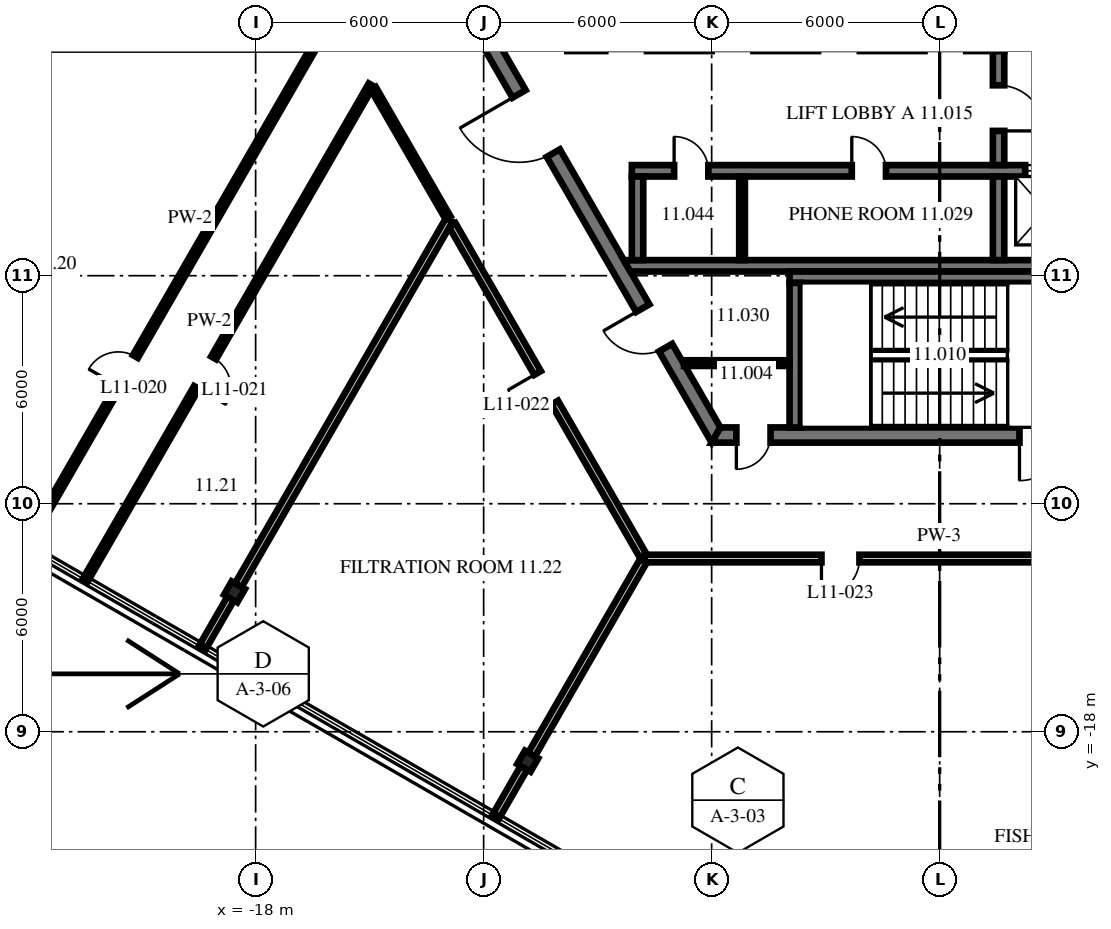
"""IFC4 building model, lengths in metres.
Left out: names, types, materials, properties, quantities, classifications, styles, units other than length and angle.
Written with IfcOpenShell. Run it as: python <this file> out.ifc"""

import sys

from ifc_helpers import new_model, si_unit, direction, frame, frame_2d, origin, origin_2d, place, context, subcontext, project, spatial, polyline, rectangle, i_section, outline, extrude, source, transform, mapped, element, fill, save


model = new_model("IFC4")
c1 = context("Model", 3, precision=1e-05, world=origin(), true_north=direction((0.0, 1.0)))
c2 = subcontext(c1, "Body", "Model", "MODEL_VIEW")
j1 = project(units=[si_unit("LENGTHUNIT", "METRE"), si_unit("PLANEANGLEUNIT", "RADIAN")], contexts=[c1])
p1 = place(None, origin())
s1 = spatial("IfcSite", under=j1, at=p1, CompositionType="ELEMENT")
p2 = place(p1, origin())
s2 = spatial("IfcBuilding", under=s1, at=p2, CompositionType="ELEMENT")
p3 = place(p2, frame((0.0, 0.0, 50.4)))
s3 = spatial("IfcBuildingStorey", under=s2, at=p3, CompositionType="ELEMENT", Elevation=50.4)
m1 = source(origin(), c2, "Body", "SweptSolid", [
    extrude(i_section(OverallWidth=0.404, OverallDepth=0.406, WebThickness=0.027, FlangeThickness=0.044, at=origin_2d()), origin(), (0.0, 0.0, 1.0), 3.15),
])
for number, where, z_axis, x_axis in (
    (1, (-18.556, -14.32, 0.0), (0.0, 0.0, 1.0), (0.866, -0.5, 0.0)),
    (2, (-10.84, -18.775, 0.0), (0.0, 0.0, 1.0), (0.866, -0.5, 0.0)),
):
    element("IfcColumn", number, at=place(p3, frame(where, z_axis=z_axis, x_axis=x_axis)), inside=s3, PredefinedType="COLUMN", context=c2, shape_type="MappedRepresentation", body=[
        mapped(m1, transform((0.0, 0.0, 0.0), scale=1.0)),
    ])
m2 = source(origin(), c2, "Body", "SweptSolid", [
    extrude(outline(polyline([(-0.115, -0.2), (11.885, -0.2), (11.654, 0.2), (0.115, 0.2), (-0.115, -0.2)])), origin(), (0.0, 0.0, 1.0), 4.05),
])
p4 = place(p3, frame((-11.769, 0.0, 0.0), z_axis=(0.0, 0.0, 1.0), x_axis=(0.499996592174, -0.866027371285, 0.0)))
e3 = element("IfcWall", 3, at=p4, inside=s3, PredefinedType="SHEAR", context=c2, shape_type="MappedRepresentation", body=[
    mapped(m2, transform((0.0, 0.0, 0.0), scale=1.0)),
])
p5 = place(p4, frame((1.405, 0.0, 0.0)))
e4 = element("IfcOpeningElement", 4, at=p5, cuts=e3, PredefinedType="OPENING", context=c2, shape_type="SweptSolid", body=[
    extrude(rectangle(XDim=1.8, YDim=2.1, at=frame_2d((0.9, 1.05))), frame((0.0, 0.21, 0.0), z_axis=(0.0, -1.0, 0.0), x_axis=(1.0, 0.0, 0.0)), (0.0, 0.0, 1.0), 0.42),
])
p6 = place(p4, frame((7.915, 0.0, 0.0)))
e5 = element("IfcOpeningElement", 5, at=p6, cuts=e3, PredefinedType="OPENING", context=c2, shape_type="SweptSolid", body=[
    extrude(rectangle(XDim=1.2, YDim=2.1, at=frame_2d((0.6, 1.05))), frame((0.0, 0.21, 0.0), z_axis=(0.0, -1.0, 0.0), x_axis=(1.0, 0.0, 0.0)), (0.0, 0.0, 1.0), 0.42),
])
p7 = place(p3, frame((-5.885, -10.192, 0.0), z_axis=(0.0, 0.0, 1.0), x_axis=(1.0, 0.0, 0.0)))
e6 = element("IfcWall", 6, at=p7, inside=s3, PredefinedType="SHEAR", context=c2, shape_type="MappedRepresentation", body=[
    mapped(m2, transform((0.0, 0.0, 0.0), scale=1.0)),
])
p8 = place(p7, frame((7.985, 0.0, 0.0)))
e7 = element("IfcOpeningElement", 7, at=p8, cuts=e6, PredefinedType="OPENING", context=c2, shape_type="SweptSolid", body=[
    extrude(rectangle(XDim=1.2, YDim=2.1, at=frame_2d((0.6, 1.05))), frame((0.0, 0.21, 0.0), z_axis=(0.0, -1.0, 0.0), x_axis=(1.0, 0.0, 0.0)), (0.0, 0.0, 1.0), 0.42),
])
p9 = place(p7, frame((0.534, 0.0, 0.0)))
e8 = element("IfcOpeningElement", 8, at=p9, cuts=e6, PredefinedType="OPENING", context=c2, shape_type="SweptSolid", body=[
    extrude(rectangle(XDim=0.9, YDim=2.1, at=frame_2d((0.45, 1.05))), frame((0.0, 0.21, 0.0), z_axis=(0.0, -1.0, 0.0), x_axis=(1.0, 0.0, 0.0)), (0.0, 0.0, 1.0), 0.42),
])
p10 = place(p3, frame((-8.1, -3.24, 0.0), z_axis=(0.0, 0.0, 1.0), x_axis=(1.0, 0.0, 0.0)))
e9 = element("IfcWall", 9, at=p10, inside=s3, PredefinedType="SHEAR", context=c2, shape_type="SweptSolid", body=[
    extrude(rectangle(XDim=12.8, YDim=0.3, at=frame_2d((6.4, 0.0))), origin(), (0.0, 0.0, 1.0), 4.05),
])
p11 = place(p10, frame((1.113, 0.0, 0.0)))
e10 = element("IfcOpeningElement", 10, at=p11, cuts=e9, PredefinedType="OPENING", context=c2, shape_type="SweptSolid", body=[
    extrude(rectangle(XDim=0.9, YDim=2.1, at=frame_2d((0.45, 1.05))), frame((0.0, 0.16, 0.0), z_axis=(0.0, -1.0, 0.0), x_axis=(1.0, 0.0, 0.0)), (0.0, 0.0, 1.0), 0.32),
])
p12 = place(p10, frame((5.788, 0.0, 0.0)))
e11 = element("IfcOpeningElement", 11, at=p12, cuts=e9, PredefinedType="OPENING", context=c2, shape_type="SweptSolid", body=[
    extrude(rectangle(XDim=0.9, YDim=2.1, at=frame_2d((0.45, 1.05))), frame((0.0, 0.16, 0.0), z_axis=(0.0, -1.0, 0.0), x_axis=(1.0, 0.0, 0.0)), (0.0, 0.0, 1.0), 0.32),
])
p13 = place(p10, frame((10.35, 0.0, 0.0)))
e12 = element("IfcOpeningElement", 12, at=p13, cuts=e9, PredefinedType="OPENING", context=c2, shape_type="SweptSolid", body=[
    extrude(rectangle(XDim=1.1, YDim=2.1, at=frame_2d((0.55, 1.05))), frame((0.0, 0.16, 0.0), z_axis=(0.0, -1.0, 0.0), x_axis=(1.0, 0.0, 0.0)), (0.0, 0.0, 1.0), 0.32),
])
p14 = place(p3, frame((-8.1, -5.74, 0.0), z_axis=(0.0, 0.0, 1.0), x_axis=(1.0, 0.0, 0.0)))
e13 = element("IfcWall", 13, at=p14, inside=s3, PredefinedType="SHEAR", context=c2, shape_type="SweptSolid", body=[
    extrude(outline(polyline([(12.0, -0.15), (-0.04, -0.15), (-0.213, 0.15), (12.0, 0.15), (12.0, -0.15)])), origin(), (0.0, 0.0, 1.0), 4.05),
])
m3 = source(origin(), c2, "Body", "SweptSolid", [
    extrude(rectangle(XDim=2.2, YDim=0.3, at=frame_2d((1.1, 0.0))), origin(), (0.0, 0.0, 1.0), 4.05),
])
for number, where, z_axis, x_axis in (
    (14, (-7.95, -5.59, 0.0), (0.0, 0.0, 1.0), (0.0, 1.0, 0.0)),
    (15, (1.55, -5.59, 0.0), (0.0, 0.0, 1.0), (0.0, 1.0, 0.0)),
):
    element("IfcWall", number, at=place(p3, frame(where, z_axis=z_axis, x_axis=x_axis)), inside=s3, PredefinedType="SHEAR", context=c2, shape_type="MappedRepresentation", body=[
        mapped(m3, transform((0.0, 0.0, 0.0), scale=1.0)),
    ])
m4 = source(origin(), c2, "Body", "SweptSolid", [
    extrude(rectangle(XDim=3.0, YDim=0.3, at=frame_2d((1.5, 0.0))), origin(), (0.0, 0.0, 1.0), 4.05),
])
p15 = place(p3, frame((1.55, -3.09, 0.0), z_axis=(0.0, 0.0, 1.0), x_axis=(0.0, 1.0, 0.0)))
e16 = element("IfcWall", 16, at=p15, inside=s3, PredefinedType="SHEAR", context=c2, shape_type="MappedRepresentation", body=[
    mapped(m4, transform((0.0, 0.0, 0.0), scale=1.0)),
])
p16 = place(p15, frame((0.9, 0.0, 0.0)))
e17 = element("IfcOpeningElement", 17, at=p16, cuts=e16, PredefinedType="OPENING", context=c2, shape_type="SweptSolid", body=[
    extrude(rectangle(XDim=1.2, YDim=2.1, at=frame_2d((0.6, 1.05))), frame((0.0, 0.16, 0.0), z_axis=(0.0, -1.0, 0.0), x_axis=(1.0, 0.0, 0.0)), (0.0, 0.0, 1.0), 0.32),
])
p17 = place(p3, frame((-3.95, -6.04, 0.0), z_axis=(0.0, 0.0, 1.0), x_axis=(1.0, 0.0, 0.0)))
e18 = element("IfcWall", 18, at=p17, inside=s3, PredefinedType="SHEAR", context=c2, shape_type="SweptSolid", body=[
    extrude(outline(polyline([(0.0, -0.15), (8.95, -0.15), (8.65, 0.15), (0.0, 0.15), (0.0, -0.15)])), origin(), (0.0, 0.0, 1.0), 4.05),
])
m5 = source(origin(), c2, "Body", "SweptSolid", [
    extrude(outline(polyline([(3.8, -0.15), (-0.004, -0.15), (-0.004, 0.15), (3.8, 0.15), (3.8, -0.15)])), origin(), (0.0, 0.0, 1.0), 4.05),
])
p18 = place(p3, frame((-3.8, -9.99, 0.0), z_axis=(0.0, 0.0, 1.0), x_axis=(0.0, 1.0, 0.0)))
e19 = element("IfcWall", 19, at=p18, inside=s3, PredefinedType="SHEAR", context=c2, shape_type="MappedRepresentation", body=[
    mapped(m5, transform((0.0, 0.0, 0.0), scale=1.0)),
])
p19 = place(p3, frame((-5.2, -5.59, 0.0), z_axis=(0.0, 0.0, 1.0), x_axis=(0.0, 1.0, 0.0)))
e20 = element("IfcWall", 20, at=p19, inside=s3, PredefinedType="PARTITIONING", context=c2, shape_type="SweptSolid", body=[
    extrude(rectangle(XDim=2.2, YDim=0.15, at=frame_2d((1.1, 0.0))), origin(), (0.0, 0.0, 1.0), 4.05),
])
p20 = place(p3, frame((-6.727, -8.3, 0.0), z_axis=(0.0, 0.0, 1.0), x_axis=(1.0, 0.0, 0.0)))
e21 = element("IfcWall", 21, at=p20, inside=s3, PredefinedType="PARTITIONING", context=c2, shape_type="SweptSolid", body=[
    extrude(rectangle(XDim=2.777, YDim=0.15, at=frame_2d((1.389, 0.0))), origin(), (0.0, 0.0, 1.0), 4.05),
])
p21 = place(p3, frame((-14.903, -1.073, 0.0), z_axis=(0.0, 0.0, 1.0), x_axis=(0.500012721296, -0.866018059016, 0.0)))
e22 = element("IfcWall", 22, at=p21, inside=s3, PredefinedType="PARTITIONING", context=c2, shape_type="SweptSolid", body=[
    extrude(rectangle(XDim=3.932, YDim=0.15, at=frame_2d((1.966, 0.0))), origin(), (0.0, 0.0, 1.0), 4.05),
])
p22 = place(p3, frame((-12.827, -4.668, 0.0), z_axis=(0.0, 0.0, 1.0), x_axis=(0.500014404596, -0.866017087127, 0.0)))
e23 = element("IfcWall", 23, at=p22, inside=s3, PredefinedType="PARTITIONING", context=c2, shape_type="SweptSolid", body=[
    extrude(rectangle(XDim=10.062, YDim=0.2, at=frame_2d((5.031, 0.0))), origin(), (0.0, 0.0, 1.0), 4.05),
])
p23 = place(p22, frame((4.493, 0.0, 0.0)))
e24 = element("IfcOpeningElement", 24, at=p23, cuts=e23, PredefinedType="OPENING", context=c2, shape_type="SweptSolid", body=[
    extrude(rectangle(XDim=0.9, YDim=2.1, at=frame_2d((0.45, 1.05))), frame((0.0, 0.11, 0.0), z_axis=(0.0, -1.0, 0.0), x_axis=(1.0, 0.0, 0.0)), (0.0, 0.0, 1.0), 0.22),
])
p24 = place(p3, frame((-7.761, -13.442, 0.0), z_axis=(0.0, 0.0, 1.0), x_axis=(1.0, 0.0, 0.0)))
e25 = element("IfcWall", 25, at=p24, inside=s3, PredefinedType="PARTITIONING", context=c2, shape_type="SweptSolid", body=[
    extrude(rectangle(XDim=15.492, YDim=0.2, at=frame_2d((7.746, 0.0))), origin(), (0.0, 0.0, 1.0), 4.05),
])
p25 = place(p24, frame((4.65, 0.0, 0.0)))
e26 = element("IfcOpeningElement", 26, at=p25, cuts=e25, PredefinedType="OPENING", context=c2, shape_type="SweptSolid", body=[
    extrude(rectangle(XDim=1.0, YDim=2.1, at=frame_2d((0.5, 1.05))), frame((0.0, 0.11, 0.0), z_axis=(0.0, -1.0, 0.0), x_axis=(1.0, 0.0, 0.0)), (0.0, 0.0, 1.0), 0.22),
])
m6 = source(origin(), c2, "Body", "SweptSolid", [
    extrude(rectangle(XDim=1.499, YDim=0.2, at=frame_2d((0.749, 0.0))), origin(), (0.0, 0.0, 1.0), 4.05),
])
p26 = place(p3, frame((-11.686, -20.24, 0.0), z_axis=(0.0, 0.0, 1.0), x_axis=(0.500169019818, 0.865927798153, 0.0)))
e27 = element("IfcWall", 27, at=p26, inside=s3, PredefinedType="PARTITIONING", context=c2, shape_type="MappedRepresentation", body=[
    mapped(m6, transform((0.0, 0.0, 0.0), scale=1.0)),
])
p27 = place(p3, frame((-10.743, -18.608, 0.0), z_axis=(0.0, 0.0, 1.0), x_axis=(0.499987757185, 0.866032472062, 0.0)))
e28 = element("IfcWall", 28, at=p27, inside=s3, PredefinedType="PARTITIONING", context=c2, shape_type="SweptSolid", body=[
    extrude(rectangle(XDim=5.895, YDim=0.2, at=frame_2d((2.947, 0.0))), origin(), (0.0, 0.0, 1.0), 3.438),
])
p28 = place(p3, frame((-19.402, -15.785, 0.0), z_axis=(0.0, 0.0, 1.0), x_axis=(0.499976292358, 0.866039090965, 0.0)))
e29 = element("IfcWall", 29, at=p28, inside=s3, PredefinedType="PARTITIONING", context=c2, shape_type="MappedRepresentation", body=[
    mapped(m6, transform((0.0, 0.0, 0.0), scale=1.0)),
])
m7 = source(origin(), c2, "Body", "SweptSolid", [
    extrude(rectangle(XDim=11.109, YDim=0.2, at=frame_2d((5.554, 0.0))), origin(), (0.0, 0.0, 1.0), 3.293),
])
p29 = place(p3, frame((-18.459, -14.153, 0.0), z_axis=(0.0, 0.0, 1.0), x_axis=(0.5000084499, 0.866020525177, 0.0)))
e30 = element("IfcWall", 30, at=p29, inside=s3, PredefinedType="PARTITIONING", context=c2, shape_type="MappedRepresentation", body=[
    mapped(m7, transform((0.0, 0.0, 0.0), scale=1.0)),
])
p30 = place(p3, frame((-22.481, -14.008, 0.0), z_axis=(0.0, 0.0, 1.0), x_axis=(0.500001023236, 0.866024813018, 0.0)))
e31 = element("IfcWall", 31, at=p30, inside=s3, PredefinedType="PARTITIONING", context=c2, shape_type="SweptSolid", body=[
    extrude(rectangle(XDim=15.046, YDim=0.15, at=frame_2d((7.523, 0.0))), origin(), (0.0, 0.0, 1.0), 4.05),
])
p31 = place(p30, frame((5.85, 0.0, 0.0)))
e32 = element("IfcOpeningElement", 32, at=p31, cuts=e31, PredefinedType="OPENING", context=c2, shape_type="SweptSolid", body=[
    extrude(rectangle(XDim=0.9, YDim=2.1, at=frame_2d((0.45, 1.05))), frame((0.0, 0.085, 0.0), z_axis=(0.0, -1.0, 0.0), x_axis=(1.0, 0.0, 0.0)), (0.0, 0.0, 1.0), 0.17),
])
p32 = place(p3, frame((-24.04, -13.108, 0.0), z_axis=(0.0, 0.0, 1.0), x_axis=(0.500008033299, 0.866020765707, 0.0)))
e33 = element("IfcWall", 33, at=p32, inside=s3, PredefinedType="PARTITIONING", context=c2, shape_type="SweptSolid", body=[
    extrude(rectangle(XDim=19.24, YDim=0.15, at=frame_2d((9.62, 0.0))), origin(), (0.0, 0.0, 1.0), 4.05),
])
p33 = place(p32, frame((4.852, 0.0, 0.0)))
e34 = element("IfcOpeningElement", 34, at=p33, cuts=e33, PredefinedType="OPENING", context=c2, shape_type="SweptSolid", body=[
    extrude(rectangle(XDim=0.9, YDim=2.1, at=frame_2d((0.45, 1.05))), frame((0.0, 0.085, 0.0), z_axis=(0.0, -1.0, 0.0), x_axis=(1.0, 0.0, 0.0)), (0.0, 0.0, 1.0), 0.17),
])
p34 = place(p8, frame((1.2, 0.0, 0.0), z_axis=(0.0, 0.0, 1.0), x_axis=(-1.0, 0.0, 0.0)))
e35 = element("IfcDoor", 35, at=p34, inside=s3, OperationType="SINGLE_SWING_RIGHT", PredefinedType="DOOR", context=c2, shape_type="SweptSolid", body=[
    extrude(rectangle(XDim=1.2, YDim=2.1, at=frame_2d((0.6, 1.05))), frame((0.0, 0.025, 0.0), z_axis=(0.0, -1.0, 0.0), x_axis=(1.0, 0.0, 0.0)), (0.0, 0.0, 1.0), 0.05),
])
fill(e7, e35)
p35 = place(p5, frame((1.8, 0.0, 0.0), z_axis=(0.0, 0.0, 1.0), x_axis=(-1.0, 0.0, 0.0)))
e36 = element("IfcDoor", 36, at=p35, inside=s3, OperationType="DOUBLE_DOOR_DOUBLE_SWING", PredefinedType="DOOR", context=c2, shape_type="SweptSolid", body=[
    extrude(rectangle(XDim=1.8, YDim=2.1, at=frame_2d((0.9, 1.05))), frame((0.0, 0.025, 0.0), z_axis=(0.0, -1.0, 0.0), x_axis=(1.0, 0.0, 0.0)), (0.0, 0.0, 1.0), 0.05),
])
fill(e4, e36)
p36 = place(p16, frame((1.2, 0.0, 0.0), z_axis=(0.0, 0.0, 1.0), x_axis=(-1.0, 0.0, 0.0)))
e37 = element("IfcDoor", 37, at=p36, inside=s3, OperationType="SINGLE_SWING_RIGHT", PredefinedType="DOOR", context=c2, shape_type="SweptSolid", body=[
    extrude(rectangle(XDim=1.2, YDim=2.1, at=frame_2d((0.6, 1.05))), frame((0.0, 0.025, 0.0), z_axis=(0.0, -1.0, 0.0), x_axis=(1.0, 0.0, 0.0)), (0.0, 0.0, 1.0), 0.05),
])
fill(e17, e37)
p37 = place(p11, origin())
e38 = element("IfcDoor", 38, at=p37, inside=s3, OperationType="SINGLE_SWING_LEFT", PredefinedType="DOOR", context=c2, shape_type="SweptSolid", body=[
    extrude(rectangle(XDim=0.9, YDim=2.1, at=frame_2d((0.45, 1.05))), frame((0.0, 0.025, 0.0), z_axis=(0.0, -1.0, 0.0), x_axis=(1.0, 0.0, 0.0)), (0.0, 0.0, 1.0), 0.05),
])
fill(e10, e38)
p38 = place(p12, origin())
e39 = element("IfcDoor", 39, at=p38, inside=s3, OperationType="SINGLE_SWING_LEFT", PredefinedType="DOOR", context=c2, shape_type="SweptSolid", body=[
    extrude(rectangle(XDim=0.9, YDim=2.1, at=frame_2d((0.45, 1.05))), frame((0.0, 0.025, 0.0), z_axis=(0.0, -1.0, 0.0), x_axis=(1.0, 0.0, 0.0)), (0.0, 0.0, 1.0), 0.05),
])
fill(e11, e39)
p39 = place(p6, frame((1.2, 0.0, 0.0), z_axis=(0.0, 0.0, 1.0), x_axis=(-1.0, 0.0, 0.0)))
e40 = element("IfcDoor", 40, at=p39, inside=s3, OperationType="SINGLE_SWING_RIGHT", PredefinedType="DOOR", context=c2, shape_type="SweptSolid", body=[
    extrude(rectangle(XDim=1.2, YDim=2.1, at=frame_2d((0.6, 1.05))), frame((0.0, 0.025, 0.0), z_axis=(0.0, -1.0, 0.0), x_axis=(1.0, 0.0, 0.0)), (0.0, 0.0, 1.0), 0.05),
])
fill(e5, e40)
p40 = place(p9, frame((0.9, 0.0, 0.0), z_axis=(0.0, 0.0, 1.0), x_axis=(-1.0, 0.0, 0.0)))
e41 = element("IfcDoor", 41, at=p40, inside=s3, OperationType="SINGLE_SWING_RIGHT", PredefinedType="DOOR", context=c2, shape_type="SweptSolid", body=[
    extrude(rectangle(XDim=0.9, YDim=2.1, at=frame_2d((0.45, 1.05))), frame((0.0, 0.025, 0.0), z_axis=(0.0, -1.0, 0.0), x_axis=(1.0, 0.0, 0.0)), (0.0, 0.0, 1.0), 0.05),
])
fill(e8, e41)
p41 = place(p13, origin())
e42 = element("IfcDoor", 42, at=p41, inside=s3, OperationType="DOUBLE_DOOR_SLIDING", PredefinedType="DOOR", context=c2, shape_type="SweptSolid", body=[
    extrude(rectangle(XDim=1.1, YDim=2.1, at=frame_2d((0.55, 1.05))), frame((0.0, 0.025, 0.0), z_axis=(0.0, -1.0, 0.0), x_axis=(1.0, 0.0, 0.0)), (0.0, 0.0, 1.0), 0.05),
])
fill(e12, e42)
p42 = place(p33, origin())
e43 = element("IfcDoor", 43, at=p42, inside=s3, OperationType="SINGLE_SWING_LEFT", PredefinedType="DOOR", context=c2, shape_type="SweptSolid", body=[
    extrude(rectangle(XDim=0.9, YDim=2.1, at=frame_2d((0.45, 1.05))), frame((0.0, 0.025, 0.0), z_axis=(0.0, -1.0, 0.0), x_axis=(1.0, 0.0, 0.0)), (0.0, 0.0, 1.0), 0.05),
])
fill(e34, e43)
p43 = place(p31, origin())
e44 = element("IfcDoor", 44, at=p43, inside=s3, OperationType="SINGLE_SWING_RIGHT", PredefinedType="DOOR", context=c2, shape_type="SweptSolid", body=[
    extrude(rectangle(XDim=0.9, YDim=2.1, at=frame_2d((0.45, 1.05))), frame((0.0, 0.025, 0.0), z_axis=(0.0, -1.0, 0.0), x_axis=(1.0, 0.0, 0.0)), (0.0, 0.0, 1.0), 0.05),
])
fill(e32, e44)
p44 = place(p23, origin())
e45 = element("IfcDoor", 45, at=p44, inside=s3, OperationType="SINGLE_SWING_RIGHT", PredefinedType="DOOR", context=c2, shape_type="SweptSolid", body=[
    extrude(rectangle(XDim=0.9, YDim=2.1, at=frame_2d((0.45, 1.05))), frame((0.0, 0.025, 0.0), z_axis=(0.0, -1.0, 0.0), x_axis=(1.0, 0.0, 0.0)), (0.0, 0.0, 1.0), 0.05),
])
fill(e24, e45)
p45 = place(p25, origin())
e46 = element("IfcDoor", 46, at=p45, inside=s3, OperationType="SINGLE_SWING_RIGHT", PredefinedType="DOOR", context=c2, shape_type="SweptSolid", body=[
    extrude(rectangle(XDim=1.0, YDim=2.1, at=frame_2d((0.5, 1.05))), frame((0.0, 0.025, 0.0), z_axis=(0.0, -1.0, 0.0), x_axis=(1.0, 0.0, 0.0)), (0.0, 0.0, 1.0), 0.05),
])
fill(e26, e46)
save(model, sys.argv[1])
